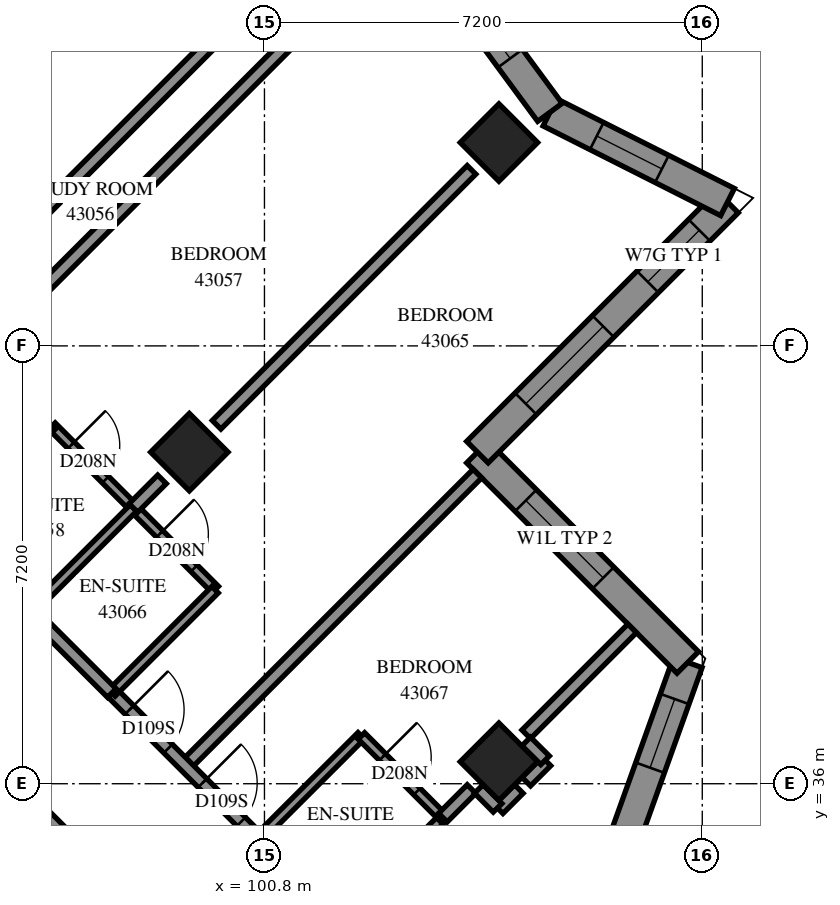
"""IFC4 building model, lengths in metres.
Left out: names, types, materials, properties, quantities, classifications, styles, units other than length and angle.
Written with IfcOpenShell. Run it as: python <this file> out.ifc"""

import sys

from ifc_helpers import new_model, si_unit, direction, frame, frame_2d, origin, origin_2d, place, context, subcontext, project, spatial, polyline, rectangle, outline, extrude, element, fill, save


model = new_model("IFC4")
c1 = context("Model", 3, precision=1e-05, world=origin(), true_north=direction((0.0, 1.0)))
c2 = subcontext(c1, "Body", "Model", "MODEL_VIEW")
j1 = project(units=[si_unit("LENGTHUNIT", "METRE"), si_unit("PLANEANGLEUNIT", "RADIAN")], contexts=[c1])
p1 = place(None, origin())
s1 = spatial("IfcSite", under=j1, at=p1, CompositionType="ELEMENT")
p2 = place(p1, origin())
s2 = spatial("IfcBuilding", under=s1, at=p2, CompositionType="ELEMENT")
p3 = place(p2, frame((0.0, 0.0, 159.2)))
s3 = spatial("IfcBuildingStorey", under=s2, at=p3, CompositionType="ELEMENT", Elevation=159.2)
for number, where, z_axis, x_axis in (
    (1, (104.656, 46.544, 0.0), (0.0, 0.0, 1.0), (0.707, -0.707, 0.0)),
    (2, (99.565, 41.453, 0.0), (0.0, 0.0, 1.0), (0.707, -0.707, 0.0)),
    (3, (104.656, 36.362, 0.0), (0.0, 0.0, 1.0), (0.707, -0.707, 0.0)),
):
    element("IfcColumn", number, at=place(p3, frame(where, z_axis=z_axis, x_axis=x_axis)), inside=s3, PredefinedType="COLUMN", context=c2, shape_type="SweptSolid", body=[
        extrude(rectangle(XDim=0.9, YDim=0.9, at=origin_2d()), origin(), (0.0, 0.0, 1.0), 3.1),
    ])
p4 = place(p3, frame((87.049, 38.695, -0.3), z_axis=(0.0, 0.0, 1.0), x_axis=(0.7071067812, 0.7071067812, 0.0)))
e4 = element("IfcWall", 4, at=p4, inside=s3, PredefinedType="SHEAR", context=c2, shape_type="SweptSolid", body=[
    extrude(rectangle(XDim=14.4, YDim=0.6, at=frame_2d((7.2, 0.0))), origin(), (0.0, 0.0, 1.0), 2.7),
])
p5 = place(p4, frame((4.55, 0.0, 0.3)))
e5 = element("IfcOpeningElement", 5, at=p5, cuts=e4, PredefinedType="OPENING", context=c2, shape_type="SweptSolid", body=[
    extrude(rectangle(XDim=1.1, YDim=2.1, at=frame_2d((0.55, 1.05))), frame((0.0, 0.31, 0.0), z_axis=(0.0, -1.0, 0.0), x_axis=(1.0, 0.0, 0.0)), (0.0, 0.0, 1.0), 0.62),
])
p6 = place(p4, frame((11.35, 0.0, 0.3)))
e6 = element("IfcOpeningElement", 6, at=p6, cuts=e4, PredefinedType="OPENING", context=c2, shape_type="SweptSolid", body=[
    extrude(rectangle(XDim=1.1, YDim=2.1, at=frame_2d((0.55, 1.05))), frame((0.0, 0.31, 0.0), z_axis=(0.0, -1.0, 0.0), x_axis=(1.0, 0.0, 0.0)), (0.0, 0.0, 1.0), 0.62),
])
p7 = place(p3, frame((105.959, 32.962, 0.0), z_axis=(0.0, 0.0, 1.0), x_axis=(0.3371362761, 0.9414558574, 0.0)))
e7 = element("IfcWall", 7, at=p7, inside=s3, PredefinedType="SOLIDWALL", context=c2, shape_type="SweptSolid", body=[
    extrude(outline(polyline([(-0.113, -0.25), (5.503, -0.25), (5.187, 0.25), (0.113, 0.25), (-0.113, -0.25)])), origin(), (0.0, 0.0, 1.0), 3.1),
])
p8 = place(p7, frame((1.17, 0.0, 0.45)))
e8 = element("IfcOpeningElement", 8, at=p8, cuts=e7, PredefinedType="OPENING", context=c2, shape_type="SweptSolid", body=[
    extrude(rectangle(XDim=1.2, YDim=2.5, at=frame_2d((0.6, 1.25))), frame((0.0, 0.26, 0.0), z_axis=(0.0, -1.0, 0.0), x_axis=(1.0, 0.0, 0.0)), (0.0, 0.0, 1.0), 0.52),
])
p9 = place(p7, frame((3.507, 0.0, 0.45)))
e9 = element("IfcOpeningElement", 9, at=p9, cuts=e7, PredefinedType="OPENING", context=c2, shape_type="SweptSolid", body=[
    extrude(rectangle(XDim=1.2, YDim=2.5, at=frame_2d((0.6, 1.25))), frame((0.0, 0.26, 0.0), z_axis=(0.0, -1.0, 0.0), x_axis=(1.0, 0.0, 0.0)), (0.0, 0.0, 1.0), 0.52),
])
p10 = place(p3, frame((107.761, 37.994, 0.0), z_axis=(0.0, 0.0, 1.0), x_axis=(-0.7071170025, 0.7070965597, 0.0)))
e10 = element("IfcWall", 10, at=p10, inside=s3, PredefinedType="SOLIDWALL", context=c2, shape_type="SweptSolid", body=[
    extrude(outline(polyline([(-0.158, -0.25), (4.642, -0.25), (5.142, 0.25), (0.158, 0.25), (-0.158, -0.25)])), origin(), (0.0, 0.0, 1.0), 3.1),
])
p11 = place(p10, frame((1.967, 0.0, 0.6)))
e11 = element("IfcOpeningElement", 11, at=p11, cuts=e10, PredefinedType="OPENING", context=c2, shape_type="SweptSolid", body=[
    extrude(rectangle(XDim=1.8, YDim=1.9, at=frame_2d((0.9, 0.95))), frame((0.0, 0.26, 0.0), z_axis=(0.0, -1.0, 0.0), x_axis=(1.0, 0.0, 0.0)), (0.0, 0.0, 1.0), 0.52),
])
p12 = place(p3, frame((104.302, 41.453, 0.0), z_axis=(0.0, 0.0, 1.0), x_axis=(0.707123973, 0.707089589, 0.0)))
e12 = element("IfcWall", 12, at=p12, inside=s3, PredefinedType="SOLIDWALL", context=c2, shape_type="SweptSolid", body=[
    extrude(outline(polyline([(0.25, -0.25), (6.162, -0.25), (5.471, 0.25), (-0.25, 0.25), (0.25, -0.25)])), origin(), (0.0, 0.0, 1.0), 3.1),
])
p13 = place(p12, frame((1.125, 0.0, 0.6)))
e13 = element("IfcOpeningElement", 13, at=p13, cuts=e12, PredefinedType="OPENING", context=c2, shape_type="SweptSolid", body=[
    extrude(rectangle(XDim=1.8, YDim=1.9, at=frame_2d((0.9, 0.95))), frame((0.0, 0.26, 0.0), z_axis=(0.0, -1.0, 0.0), x_axis=(1.0, 0.0, 0.0)), (0.0, 0.0, 1.0), 0.52),
])
p14 = place(p12, frame((3.961, 0.0, 0.6)))
e14 = element("IfcOpeningElement", 14, at=p14, cuts=e12, PredefinedType="OPENING", context=c2, shape_type="SweptSolid", body=[
    extrude(rectangle(XDim=1.2, YDim=1.9, at=frame_2d((0.6, 0.95))), frame((0.0, 0.26, 0.0), z_axis=(0.0, -1.0, 0.0), x_axis=(1.0, 0.0, 0.0)), (0.0, 0.0, 1.0), 0.52),
])
p15 = place(p3, frame((108.415, 45.566, 0.0), z_axis=(0.0, 0.0, 1.0), x_axis=(-0.8926785051, 0.4506940054, 0.0)))
e15 = element("IfcWall", 15, at=p15, inside=s3, PredefinedType="SOLIDWALL", context=c2, shape_type="SweptSolid", body=[
    extrude(outline(polyline([(-0.345, -0.25), (3.213, -0.25), (3.332, 0.25), (0.345, 0.25), (-0.345, -0.25)])), origin(), (0.0, 0.0, 1.0), 3.1),
])
p16 = place(p15, frame((1.209, 0.0, 0.45)))
e16 = element("IfcOpeningElement", 16, at=p16, cuts=e15, PredefinedType="OPENING", context=c2, shape_type="SweptSolid", body=[
    extrude(rectangle(XDim=1.2, YDim=2.5, at=frame_2d((0.6, 1.25))), frame((0.0, 0.26, 0.0), z_axis=(0.0, -1.0, 0.0), x_axis=(1.0, 0.0, 0.0)), (0.0, 0.0, 1.0), 0.52),
])
p17 = place(p3, frame((105.494, 47.041, 0.0), z_axis=(0.0, 0.0, 1.0), x_axis=(-0.5932158949, 0.8050434162, 0.0)))
e17 = element("IfcWall", 17, at=p17, inside=s3, PredefinedType="SOLIDWALL", context=c2, shape_type="SweptSolid", body=[
    extrude(outline(polyline([(0.06, -0.25), (3.478, -0.25), (3.402, 0.25), (-0.06, 0.25), (0.06, -0.25)])), origin(), (0.0, 0.0, 1.0), 3.1),
])
p18 = place(p17, frame((1.101, 0.0, 0.45)))
e18 = element("IfcOpeningElement", 18, at=p18, cuts=e17, PredefinedType="OPENING", context=c2, shape_type="SweptSolid", body=[
    extrude(rectangle(XDim=1.2, YDim=2.5, at=frame_2d((0.6, 1.25))), frame((0.0, 0.26, 0.0), z_axis=(0.0, -1.0, 0.0), x_axis=(1.0, 0.0, 0.0)), (0.0, 0.0, 1.0), 0.52),
])
p19 = place(p3, frame((94.401, 41.383, 0.0), z_axis=(0.0, 0.0, 1.0), x_axis=(0.7071067812, 0.7071067812, 0.0)))
e19 = element("IfcWall", 19, at=p19, inside=s3, PredefinedType="PARTITIONING", context=c2, shape_type="SweptSolid", body=[
    extrude(rectangle(XDim=12.04, YDim=0.2, at=frame_2d((6.02, 0.0))), origin(), (0.0, 0.0, 1.0), 3.1),
])
p20 = place(p3, frame((92.209, 40.459, 0.0), z_axis=(0.0, 0.0, 1.0), x_axis=(0.7071067812, -0.7071067812, 0.0)))
e20 = element("IfcWall", 20, at=p20, inside=s3, PredefinedType="PARTITIONING", context=c2, shape_type="SweptSolid", body=[
    extrude(rectangle(XDim=11.698, YDim=0.2, at=frame_2d((5.849, 0.0))), origin(), (0.0, 0.0, 1.0), 3.1),
])
p21 = place(p20, frame((2.931, 0.0, 0.0)))
e21 = element("IfcOpeningElement", 21, at=p21, cuts=e20, PredefinedType="OPENING", context=c2, shape_type="SweptSolid", body=[
    extrude(rectangle(XDim=1.0, YDim=2.1, at=frame_2d((0.5, 1.05))), frame((0.0, 0.11, 0.0), z_axis=(0.0, -1.0, 0.0), x_axis=(1.0, 0.0, 0.0)), (0.0, 0.0, 1.0), 0.22),
])
p22 = place(p20, frame((10.223, 0.0, 0.0)))
e22 = element("IfcOpeningElement", 22, at=p22, cuts=e20, PredefinedType="OPENING", context=c2, shape_type="SweptSolid", body=[
    extrude(rectangle(XDim=0.9, YDim=2.1, at=frame_2d((0.45, 1.05))), frame((0.0, 0.11, 0.0), z_axis=(0.0, -1.0, 0.0), x_axis=(1.0, 0.0, 0.0)), (0.0, 0.0, 1.0), 0.22),
])
p23 = place(p3, frame((93.767, 42.021, 0.0), z_axis=(0.0, 0.0, 1.0), x_axis=(0.7071067812, 0.7071067812, 0.0)))
e23 = element("IfcWall", 23, at=p23, inside=s3, PredefinedType="PARTITIONING", context=c2, shape_type="SweptSolid", body=[
    extrude(rectangle(XDim=9.998, YDim=0.2, at=frame_2d((4.999, 0.0))), origin(), (0.0, 0.0, 1.0), 3.1),
])
p24 = place(p23, frame((0.196, 0.0, 0.0)))
e24 = element("IfcOpeningElement", 24, at=p24, cuts=e23, PredefinedType="OPENING", context=c2, shape_type="SweptSolid", body=[
    extrude(rectangle(XDim=1.0, YDim=2.1, at=frame_2d((0.5, 1.05))), frame((0.0, 0.11, 0.0), z_axis=(0.0, -1.0, 0.0), x_axis=(1.0, 0.0, 0.0)), (0.0, 0.0, 1.0), 0.22),
])
p25 = place(p3, frame((99.494, 36.292, 0.0), z_axis=(0.0, 0.0, 1.0), x_axis=(0.7071067812, 0.7071067812, 0.0)))
e25 = element("IfcWall", 25, at=p25, inside=s3, PredefinedType="PARTITIONING", context=c2, shape_type="SweptSolid", body=[
    extrude(rectangle(XDim=6.799, YDim=0.2, at=frame_2d((3.4, 0.0))), origin(), (0.0, 0.0, 1.0), 3.1),
])
p26 = place(p3, frame((100.013, 41.903, 0.0), z_axis=(0.0, 0.0, 1.0), x_axis=(0.7071067812, 0.7071067812, 0.0)))
e26 = element("IfcWall", 26, at=p26, inside=s3, PredefinedType="PARTITIONING", context=c2, shape_type="SweptSolid", body=[
    extrude(rectangle(XDim=5.928, YDim=0.2, at=frame_2d((2.964, 0.0))), origin(), (0.0, 0.0, 1.0), 3.1),
])
p27 = place(p3, frame((98.295, 37.497, 0.0), z_axis=(0.0, 0.0, 1.0), x_axis=(0.7071067812, -0.7071067812, 0.0)))
e27 = element("IfcWall", 27, at=p27, inside=s3, PredefinedType="PARTITIONING", context=c2, shape_type="SweptSolid", body=[
    extrude(rectangle(XDim=5.301, YDim=0.2, at=frame_2d((2.65, 0.0))), origin(), (0.0, 0.0, 1.0), 3.1),
])
p28 = place(p27, frame((0.401, 0.0, 0.0)))
e28 = element("IfcOpeningElement", 28, at=p28, cuts=e27, PredefinedType="OPENING", context=c2, shape_type="SweptSolid", body=[
    extrude(rectangle(XDim=0.9, YDim=2.1, at=frame_2d((0.45, 1.05))), frame((0.0, 0.11, 0.0), z_axis=(0.0, -1.0, 0.0), x_axis=(1.0, 0.0, 0.0)), (0.0, 0.0, 1.0), 0.22),
])
p29 = place(p27, frame((2.1, 0.0, 0.0)))
e29 = element("IfcOpeningElement", 29, at=p29, cuts=e27, PredefinedType="OPENING", context=c2, shape_type="SweptSolid", body=[
    extrude(rectangle(XDim=0.9, YDim=2.1, at=frame_2d((0.45, 1.05))), frame((0.0, 0.11, 0.0), z_axis=(0.0, -1.0, 0.0), x_axis=(1.0, 0.0, 0.0)), (0.0, 0.0, 1.0), 0.22),
])
p30 = place(p3, frame((97.305, 41.881, 0.0), z_axis=(0.0, 0.0, 1.0), x_axis=(0.7067382634, -0.707475107, 0.0)))
e30 = element("IfcWall", 30, at=p30, inside=s3, PredefinedType="PARTITIONING", context=c2, shape_type="SweptSolid", body=[
    extrude(rectangle(XDim=3.8, YDim=0.15, at=frame_2d((1.9, 0.0))), origin(), (0.0, 0.0, 1.0), 3.1),
])
p31 = place(p30, frame((0.445, 0.0, 0.0)))
e31 = element("IfcOpeningElement", 31, at=p31, cuts=e30, PredefinedType="OPENING", context=c2, shape_type="SweptSolid", body=[
    extrude(rectangle(XDim=0.8, YDim=2.1, at=frame_2d((0.4, 1.05))), frame((0.0, 0.085, 0.0), z_axis=(0.0, -1.0, 0.0), x_axis=(1.0, 0.0, 0.0)), (0.0, 0.0, 1.0), 0.17),
])
p32 = place(p30, frame((2.507, 0.0, 0.0)))
e32 = element("IfcOpeningElement", 32, at=p32, cuts=e30, PredefinedType="OPENING", context=c2, shape_type="SweptSolid", body=[
    extrude(rectangle(XDim=0.8, YDim=2.1, at=frame_2d((0.4, 1.05))), frame((0.0, 0.085, 0.0), z_axis=(0.0, -1.0, 0.0), x_axis=(1.0, 0.0, 0.0)), (0.0, 0.0, 1.0), 0.17),
])
p33 = place(p3, frame((105.105, 36.813, 0.0), z_axis=(0.0, 0.0, 1.0), x_axis=(0.7071067812, 0.7071067812, 0.0)))
e33 = element("IfcWall", 33, at=p33, inside=s3, PredefinedType="PARTITIONING", context=c2, shape_type="SweptSolid", body=[
    extrude(rectangle(XDim=2.463, YDim=0.2, at=frame_2d((1.232, 0.0))), origin(), (0.0, 0.0, 1.0), 3.1),
])
for number, where, z_axis, x_axis in (
    (34, (95.603, 40.181, 0.0), (0.0, 0.0, 1.0), (0.707, 0.707, 0.0)),
    (35, (96.947, 38.837, 0.0), (0.0, 0.0, 1.0), (0.707, 0.707, 0.0)),
):
    element("IfcWall", number, at=place(p3, frame(where, z_axis=z_axis, x_axis=x_axis)), inside=s3, PredefinedType="PARTITIONING", context=c2, shape_type="SweptSolid", body=[
        extrude(rectangle(XDim=2.401, YDim=0.15, at=frame_2d((1.201, 0.0))), origin(), (0.0, 0.0, 1.0), 3.1),
    ])
p34 = place(p3, frame((100.693, 35.093, 0.0), z_axis=(0.0, 0.0, 1.0), x_axis=(0.7075233388, 0.706689978, 0.0)))
e36 = element("IfcWall", 36, at=p34, inside=s3, PredefinedType="PARTITIONING", context=c2, shape_type="SweptSolid", body=[
    extrude(rectangle(XDim=2.4, YDim=0.15, at=frame_2d((1.2, 0.0))), origin(), (0.0, 0.0, 1.0), 3.1),
])
p35 = place(p3, frame((98.291, 37.495, 0.0), z_axis=(0.0, 0.0, 1.0), x_axis=(0.7071067812, 0.7071067812, 0.0)))
e37 = element("IfcWall", 37, at=p35, inside=s3, PredefinedType="PARTITIONING", context=c2, shape_type="SweptSolid", body=[
    extrude(rectangle(XDim=2.398, YDim=0.15, at=frame_2d((1.199, 0.0))), origin(), (0.0, 0.0, 1.0), 3.1),
])
p36 = place(p3, frame((102.039, 33.747, 0.0), z_axis=(0.0, 0.0, 1.0), x_axis=(0.7071067812, 0.7071067812, 0.0)))
e38 = element("IfcWall", 38, at=p36, inside=s3, PredefinedType="PARTITIONING", context=c2, shape_type="SweptSolid", body=[
    extrude(rectangle(XDim=2.398, YDim=0.15, at=frame_2d((1.199, 0.0))), origin(), (0.0, 0.0, 1.0), 2.6),
])
p37 = place(p3, frame((96.946, 38.834, 0.0), z_axis=(0.0, 0.0, 1.0), x_axis=(0.7076330979, -0.7065800724, 0.0)))
e39 = element("IfcWall", 39, at=p37, inside=s3, PredefinedType="PARTITIONING", context=c2, shape_type="SweptSolid", body=[
    extrude(rectangle(XDim=1.899, YDim=0.2, at=frame_2d((0.95, 0.0))), origin(), (0.0, 0.0, 1.0), 3.1),
])
p38 = place(p3, frame((102.394, 36.786, 0.0), z_axis=(0.0, 0.0, 1.0), x_axis=(0.7065800724, -0.7076330979, 0.0)))
e40 = element("IfcWall", 40, at=p38, inside=s3, PredefinedType="PARTITIONING", context=c2, shape_type="SweptSolid", body=[
    extrude(rectangle(XDim=1.899, YDim=0.15, at=frame_2d((0.95, 0.0))), origin(), (0.0, 0.0, 1.0), 3.1),
])
p39 = place(p38, frame((0.492, 0.0, 0.0)))
e41 = element("IfcOpeningElement", 41, at=p39, cuts=e40, PredefinedType="OPENING", context=c2, shape_type="SweptSolid", body=[
    extrude(rectangle(XDim=0.8, YDim=2.1, at=frame_2d((0.4, 1.05))), frame((0.0, 0.085, 0.0), z_axis=(0.0, -1.0, 0.0), x_axis=(1.0, 0.0, 0.0)), (0.0, 0.0, 1.0), 0.17),
])
p40 = place(p3, frame((103.735, 35.443, 0.0), z_axis=(0.0, 0.0, 1.0), x_axis=(0.7071067812, 0.7071067812, 0.0)))
e42 = element("IfcWall", 42, at=p40, inside=s3, PredefinedType="PARTITIONING", context=c2, shape_type="SweptSolid", body=[
    extrude(rectangle(XDim=0.665, YDim=0.2, at=frame_2d((0.332, 0.0))), origin(), (0.0, 0.0, 1.0), 2.6),
])
p41 = place(p3, frame((98.645, 40.535, 0.0), z_axis=(0.0, 0.0, 1.0), x_axis=(0.7071067812, 0.7071067812, 0.0)))
e43 = element("IfcWall", 43, at=p41, inside=s3, PredefinedType="PARTITIONING", context=c2, shape_type="SweptSolid", body=[
    extrude(rectangle(XDim=0.665, YDim=0.2, at=frame_2d((0.332, 0.0))), origin(), (0.0, 0.0, 1.0), 3.1),
])
for number, where, z_axis, x_axis in (
    (44, (104.651, 35.581, 0.0), (0.0, 0.0, 1.0), (0.707, 0.707, 0.0)),
    (45, (105.105, 36.035, 0.0), (0.0, 0.0, 1.0), (0.707, 0.707, 0.0)),
):
    element("IfcWall", number, at=place(p3, frame(where, z_axis=z_axis, x_axis=x_axis)), inside=s3, PredefinedType="PARTITIONING", context=c2, shape_type="SweptSolid", body=[
        extrude(rectangle(XDim=0.469, YDim=0.2, at=frame_2d((0.235, 0.0))), origin(), (0.0, 0.0, 1.0), 3.1),
    ])
for number, where, z_axis, x_axis in (
    (46, (105.104, 36.694, 0.0), (0.0, 0.0, 1.0), (0.709, -0.705, 0.0)),
    (47, (104.325, 35.915, 0.0), (0.0, 0.0, 1.0), (0.705, -0.709, 0.0)),
):
    element("IfcWall", number, at=place(p3, frame(where, z_axis=z_axis, x_axis=x_axis)), inside=s3, PredefinedType="PARTITIONING", context=c2, shape_type="SweptSolid", body=[
        extrude(rectangle(XDim=0.438, YDim=0.2, at=frame_2d((0.219, 0.0))), origin(), (0.0, 0.0, 1.0), 3.1),
    ])
p42 = place(p9, origin())
e48 = element("IfcWindow", 48, at=p42, inside=s3, PartitioningType="SINGLE_PANEL", PredefinedType="WINDOW", context=c2, shape_type="SweptSolid", body=[
    extrude(rectangle(XDim=1.2, YDim=2.5, at=frame_2d((0.6, 1.25))), frame((0.0, 0.18, 0.0), z_axis=(0.0, -1.0, 0.0), x_axis=(1.0, 0.0, 0.0)), (0.0, 0.0, 1.0), 0.06),
])
fill(e9, e48)
p43 = place(p11, origin())
e49 = element("IfcWindow", 49, at=p43, inside=s3, PartitioningType="SINGLE_PANEL", PredefinedType="WINDOW", context=c2, shape_type="SweptSolid", body=[
    extrude(rectangle(XDim=1.8, YDim=1.9, at=frame_2d((0.9, 0.95))), frame((0.0, 0.18, 0.0), z_axis=(0.0, -1.0, 0.0), x_axis=(1.0, 0.0, 0.0)), (0.0, 0.0, 1.0), 0.06),
])
fill(e11, e49)
p44 = place(p13, origin())
e50 = element("IfcWindow", 50, at=p44, inside=s3, PartitioningType="SINGLE_PANEL", PredefinedType="WINDOW", context=c2, shape_type="SweptSolid", body=[
    extrude(rectangle(XDim=1.8, YDim=1.9, at=frame_2d((0.9, 0.95))), frame((0.0, 0.18, 0.0), z_axis=(0.0, -1.0, 0.0), x_axis=(1.0, 0.0, 0.0)), (0.0, 0.0, 1.0), 0.06),
])
fill(e13, e50)
p45 = place(p14, origin())
e51 = element("IfcWindow", 51, at=p45, inside=s3, PartitioningType="SINGLE_PANEL", PredefinedType="WINDOW", context=c2, shape_type="SweptSolid", body=[
    extrude(rectangle(XDim=1.2, YDim=1.9, at=frame_2d((0.6, 0.95))), frame((0.0, 0.18, 0.0), z_axis=(0.0, -1.0, 0.0), x_axis=(1.0, 0.0, 0.0)), (0.0, 0.0, 1.0), 0.06),
])
fill(e14, e51)
p46 = place(p16, origin())
e52 = element("IfcWindow", 52, at=p46, inside=s3, PartitioningType="SINGLE_PANEL", PredefinedType="WINDOW", context=c2, shape_type="SweptSolid", body=[
    extrude(rectangle(XDim=1.2, YDim=2.5, at=frame_2d((0.6, 1.25))), frame((0.0, 0.18, 0.0), z_axis=(0.0, -1.0, 0.0), x_axis=(1.0, 0.0, 0.0)), (0.0, 0.0, 1.0), 0.06),
])
fill(e16, e52)
p47 = place(p18, origin())
e53 = element("IfcWindow", 53, at=p47, inside=s3, PartitioningType="SINGLE_PANEL", PredefinedType="WINDOW", context=c2, shape_type="SweptSolid", body=[
    extrude(rectangle(XDim=1.2, YDim=2.5, at=frame_2d((0.6, 1.25))), frame((0.0, 0.18, 0.0), z_axis=(0.0, -1.0, 0.0), x_axis=(1.0, 0.0, 0.0)), (0.0, 0.0, 1.0), 0.06),
])
fill(e18, e53)
p48 = place(p31, origin())
e54 = element("IfcDoor", 54, at=p48, inside=s3, OperationType="SINGLE_SWING_RIGHT", PredefinedType="DOOR", context=c2, shape_type="SweptSolid", body=[
    extrude(rectangle(XDim=0.8, YDim=2.1, at=frame_2d((0.4, 1.05))), frame((0.0, 0.025, 0.0), z_axis=(0.0, -1.0, 0.0), x_axis=(1.0, 0.0, 0.0)), (0.0, 0.0, 1.0), 0.05),
])
fill(e31, e54)
p49 = place(p28, origin())
e55 = element("IfcDoor", 55, at=p49, inside=s3, OperationType="SINGLE_SWING_LEFT", PredefinedType="DOOR", context=c2, shape_type="SweptSolid", body=[
    extrude(rectangle(XDim=0.9, YDim=2.1, at=frame_2d((0.45, 1.05))), frame((0.0, 0.025, 0.0), z_axis=(0.0, -1.0, 0.0), x_axis=(1.0, 0.0, 0.0)), (0.0, 0.0, 1.0), 0.05),
])
fill(e28, e55)
p50 = place(p32, origin())
e56 = element("IfcDoor", 56, at=p50, inside=s3, OperationType="SINGLE_SWING_RIGHT", PredefinedType="DOOR", context=c2, shape_type="SweptSolid", body=[
    extrude(rectangle(XDim=0.8, YDim=2.1, at=frame_2d((0.4, 1.05))), frame((0.0, 0.025, 0.0), z_axis=(0.0, -1.0, 0.0), x_axis=(1.0, 0.0, 0.0)), (0.0, 0.0, 1.0), 0.05),
])
fill(e32, e56)
p51 = place(p29, origin())
e57 = element("IfcDoor", 57, at=p51, inside=s3, OperationType="SINGLE_SWING_RIGHT", PredefinedType="DOOR", context=c2, shape_type="SweptSolid", body=[
    extrude(rectangle(XDim=0.9, YDim=2.1, at=frame_2d((0.45, 1.05))), frame((0.0, 0.025, 0.0), z_axis=(0.0, -1.0, 0.0), x_axis=(1.0, 0.0, 0.0)), (0.0, 0.0, 1.0), 0.05),
])
fill(e29, e57)
p52 = place(p39, origin())
e58 = element("IfcDoor", 58, at=p52, inside=s3, OperationType="SINGLE_SWING_RIGHT", PredefinedType="DOOR", context=c2, shape_type="SweptSolid", body=[
    extrude(rectangle(XDim=0.8, YDim=2.1, at=frame_2d((0.4, 1.05))), frame((0.0, 0.025, 0.0), z_axis=(0.0, -1.0, 0.0), x_axis=(1.0, 0.0, 0.0)), (0.0, 0.0, 1.0), 0.05),
])
fill(e41, e58)
save(model, sys.argv[1])
